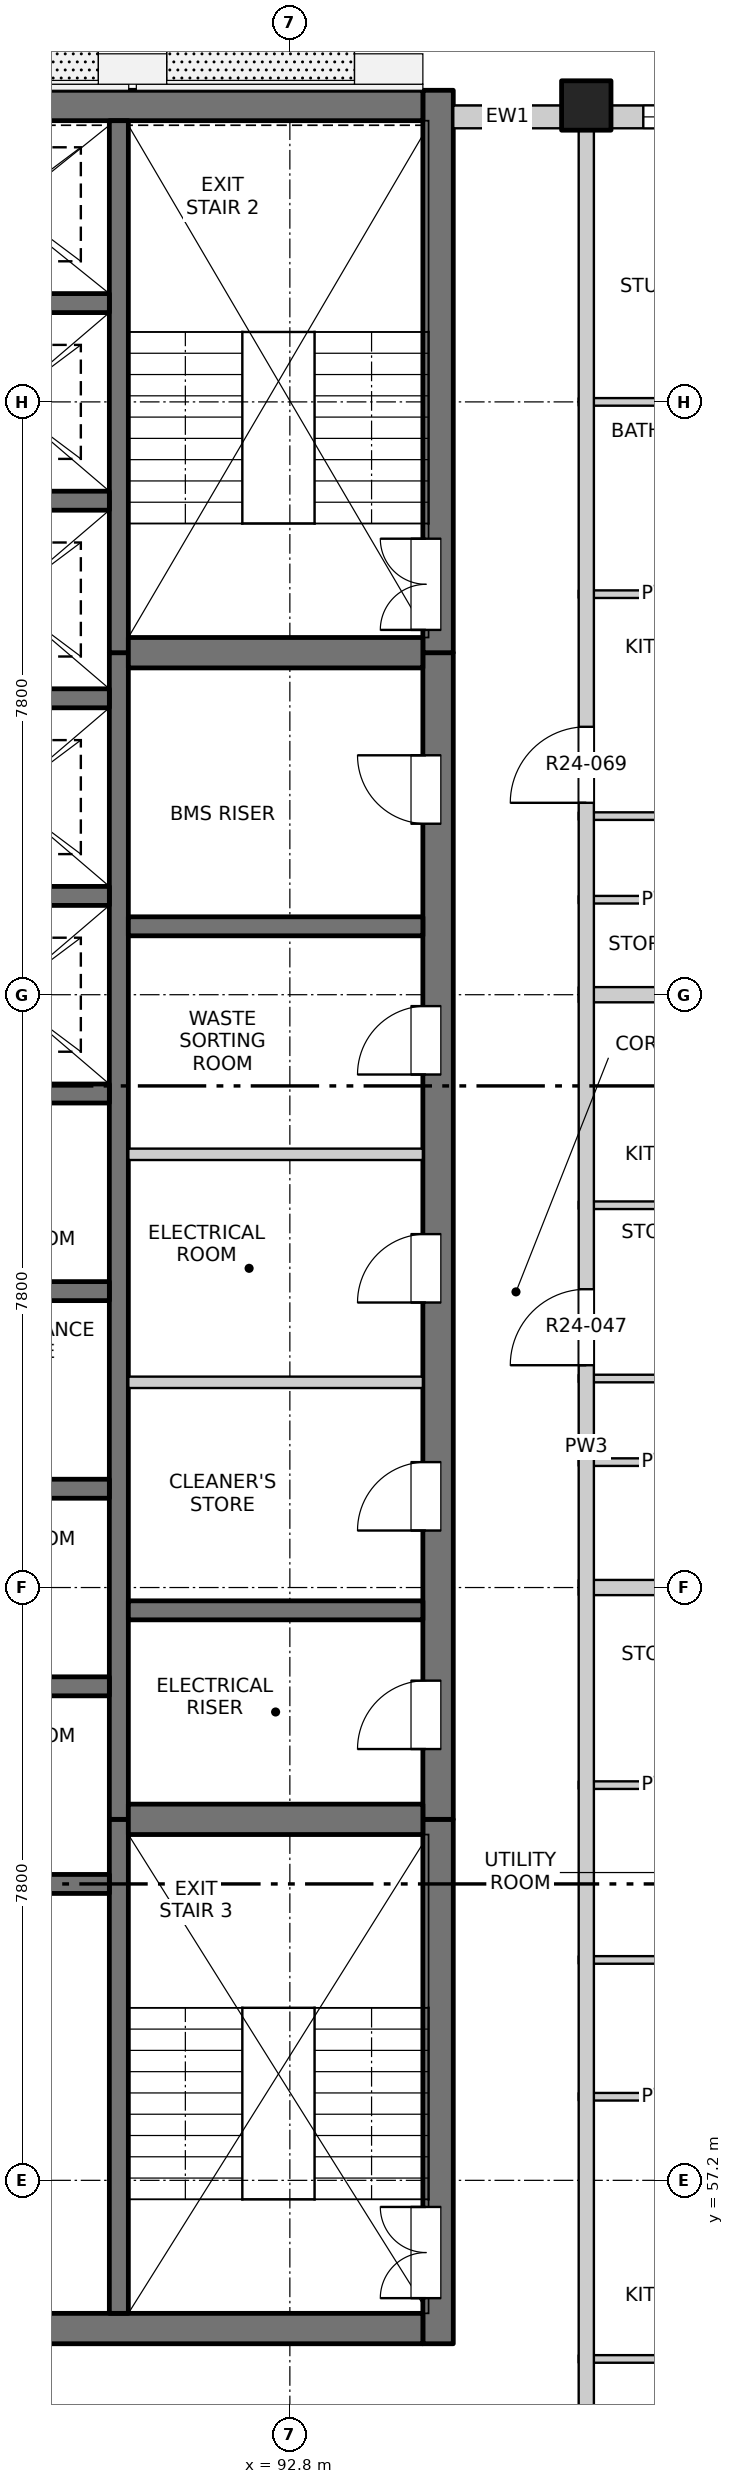
"""IFC4 building model, lengths in metres.
Left out: names, types, materials, properties, quantities, classifications, styles, units other than length and angle.
Written with IfcOpenShell. Run it as: python <this file> out.ifc"""

import sys

from ifc_helpers import new_model, si_unit, direction, frame, frame_2d, origin, origin_2d, place, context, subcontext, project, spatial, rectangle, extrude, element, fill, save


model = new_model("IFC4")
c1 = context("Model", 3, precision=1e-05, world=origin(), true_north=direction((0.0, 1.0)))
c2 = subcontext(c1, "Body", "Model", "MODEL_VIEW")
j1 = project(units=[si_unit("LENGTHUNIT", "METRE"), si_unit("PLANEANGLEUNIT", "RADIAN")], contexts=[c1])
p1 = place(None, origin())
s1 = spatial("IfcSite", under=j1, at=p1, CompositionType="ELEMENT")
p2 = place(p1, origin())
s2 = spatial("IfcBuilding", under=s1, at=p2, CompositionType="ELEMENT")
p3 = place(p2, frame((0.0, 0.0, 249.4)))
s3 = spatial("IfcBuildingStorey", under=s2, at=p3, CompositionType="ELEMENT", Elevation=249.4)
p4 = place(p3, frame((96.7, 84.5, -0.25), z_axis=(0.0, 0.0, 1.0), x_axis=(1.0, 0.0, 0.0)))
e1 = element("IfcColumn", 1, at=p4, inside=s3, PredefinedType="COLUMN", context=c2, shape_type="SweptSolid", body=[
    extrude(rectangle(XDim=0.65, YDim=0.65, at=origin_2d()), origin(), (0.0, 0.0, 1.0), 3.4),
])
p5 = place(p3, frame((94.75, 55.05, -0.25), z_axis=(0.0, 0.0, 1.0), x_axis=(0.0, 1.0, 0.0)))
e2 = element("IfcWall", 2, at=p5, inside=s3, PredefinedType="SOLIDWALL", context=c2, shape_type="SweptSolid", body=[
    extrude(rectangle(XDim=6.9, YDim=0.4, at=frame_2d((3.45, 0.0))), origin(), (0.0, 0.0, 1.0), 3.4),
])
p6 = place(p5, frame((0.6, 0.0, 0.25)))
e3 = element("IfcOpeningElement", 3, at=p6, cuts=e2, PredefinedType="OPENING", context=c2, shape_type="SweptSolid", body=[
    extrude(rectangle(XDim=1.2, YDim=2.1, at=frame_2d((0.6, 1.05))), frame((0.0, 0.21, 0.0), z_axis=(0.0, -1.0, 0.0), x_axis=(1.0, 0.0, 0.0)), (0.0, 0.0, 1.0), 0.42),
])
p7 = place(p3, frame((94.75, 61.95, -0.25), z_axis=(0.0, 0.0, 1.0), x_axis=(0.0, 1.0, 0.0)))
e4 = element("IfcWall", 4, at=p7, inside=s3, PredefinedType="SOLIDWALL", context=c2, shape_type="SweptSolid", body=[
    extrude(rectangle(XDim=15.35, YDim=0.4, at=frame_2d((7.675, 0.0))), origin(), (0.0, 0.0, 1.0), 3.4),
])
p8 = place(p7, frame((0.925, 0.0, 0.25)))
e5 = element("IfcOpeningElement", 5, at=p8, cuts=e4, PredefinedType="OPENING", context=c2, shape_type="SweptSolid", body=[
    extrude(rectangle(XDim=0.9, YDim=2.1, at=frame_2d((0.45, 1.05))), frame((0.0, 0.21, 0.0), z_axis=(0.0, -1.0, 0.0), x_axis=(1.0, 0.0, 0.0)), (0.0, 0.0, 1.0), 0.42),
])
p9 = place(p7, frame((3.8, 0.0, 0.25)))
e6 = element("IfcOpeningElement", 6, at=p9, cuts=e4, PredefinedType="OPENING", context=c2, shape_type="SweptSolid", body=[
    extrude(rectangle(XDim=0.9, YDim=2.1, at=frame_2d((0.45, 1.05))), frame((0.0, 0.21, 0.0), z_axis=(0.0, -1.0, 0.0), x_axis=(1.0, 0.0, 0.0)), (0.0, 0.0, 1.0), 0.42),
])
p10 = place(p7, frame((6.8, 0.0, 0.25)))
e7 = element("IfcOpeningElement", 7, at=p10, cuts=e4, PredefinedType="OPENING", context=c2, shape_type="SweptSolid", body=[
    extrude(rectangle(XDim=0.9, YDim=2.1, at=frame_2d((0.45, 1.05))), frame((0.0, 0.21, 0.0), z_axis=(0.0, -1.0, 0.0), x_axis=(1.0, 0.0, 0.0)), (0.0, 0.0, 1.0), 0.42),
])
p11 = place(p7, frame((9.8, 0.0, 0.25)))
e8 = element("IfcOpeningElement", 8, at=p11, cuts=e4, PredefinedType="OPENING", context=c2, shape_type="SweptSolid", body=[
    extrude(rectangle(XDim=0.9, YDim=2.1, at=frame_2d((0.45, 1.05))), frame((0.0, 0.21, 0.0), z_axis=(0.0, -1.0, 0.0), x_axis=(1.0, 0.0, 0.0)), (0.0, 0.0, 1.0), 0.42),
])
p12 = place(p7, frame((13.1, 0.0, 0.25)))
e9 = element("IfcOpeningElement", 9, at=p12, cuts=e4, PredefinedType="OPENING", context=c2, shape_type="SweptSolid", body=[
    extrude(rectangle(XDim=0.9, YDim=2.1, at=frame_2d((0.45, 1.05))), frame((0.0, 0.21, 0.0), z_axis=(0.0, -1.0, 0.0), x_axis=(1.0, 0.0, 0.0)), (0.0, 0.0, 1.0), 0.42),
])
p13 = place(p3, frame((94.75, 77.3, -0.25), z_axis=(0.0, 0.0, 1.0), x_axis=(0.0, 1.0, 0.0)))
e10 = element("IfcWall", 10, at=p13, inside=s3, PredefinedType="SOLIDWALL", context=c2, shape_type="SweptSolid", body=[
    extrude(rectangle(XDim=7.4, YDim=0.4, at=frame_2d((3.7, 0.0))), origin(), (0.0, 0.0, 1.0), 3.4),
])
p14 = place(p13, frame((0.3, 0.0, 0.25)))
e11 = element("IfcOpeningElement", 11, at=p14, cuts=e10, PredefinedType="OPENING", context=c2, shape_type="SweptSolid", body=[
    extrude(rectangle(XDim=1.2, YDim=2.1, at=frame_2d((0.6, 1.05))), frame((0.0, 0.21, 0.0), z_axis=(0.0, -1.0, 0.0), x_axis=(1.0, 0.0, 0.0)), (0.0, 0.0, 1.0), 0.42),
])
p15 = place(p3, frame((75.45, 55.25, -0.25), z_axis=(0.0, 0.0, 1.0), x_axis=(1.0, 0.0, 0.0)))
e12 = element("IfcWall", 12, at=p15, inside=s3, PredefinedType="SOLIDWALL", context=c2, shape_type="SweptSolid", body=[
    extrude(rectangle(XDim=19.1, YDim=0.4, at=frame_2d((9.55, 0.0))), origin(), (0.0, 0.0, 1.0), 3.4),
])
p16 = place(p15, frame((8.8, 0.0, 0.25)))
e13 = element("IfcOpeningElement", 13, at=p16, cuts=e12, PredefinedType="OPENING", context=c2, shape_type="SweptSolid", body=[
    extrude(rectangle(XDim=1.5, YDim=2.1, at=frame_2d((0.75, 1.05))), frame((0.0, 0.21, 0.0), z_axis=(0.0, -1.0, 0.0), x_axis=(1.0, 0.0, 0.0)), (0.0, 0.0, 1.0), 0.42),
])
p17 = place(p3, frame((75.45, 84.5, -0.25), z_axis=(0.0, 0.0, 1.0), x_axis=(1.0, 0.0, 0.0)))
e14 = element("IfcWall", 14, at=p17, inside=s3, PredefinedType="SOLIDWALL", context=c2, shape_type="SweptSolid", body=[
    extrude(rectangle(XDim=19.1, YDim=0.4, at=frame_2d((9.55, 0.0))), origin(), (0.0, 0.0, 1.0), 3.4),
])
p18 = place(p3, frame((90.55, 55.45, -0.25), z_axis=(0.0, 0.0, 1.0), x_axis=(0.0, 1.0, 0.0)))
e15 = element("IfcWall", 15, at=p18, inside=s3, PredefinedType="SOLIDWALL", context=c2, shape_type="SweptSolid", body=[
    extrude(rectangle(XDim=6.5, YDim=0.25, at=frame_2d((3.25, 0.0))), origin(), (0.0, 0.0, 1.0), 3.4),
])
p19 = place(p3, frame((90.55, 61.95, -0.25), z_axis=(0.0, 0.0, 1.0), x_axis=(0.0, 1.0, 0.0)))
e16 = element("IfcWall", 16, at=p19, inside=s3, PredefinedType="SOLIDWALL", context=c2, shape_type="SweptSolid", body=[
    extrude(rectangle(XDim=15.35, YDim=0.25, at=frame_2d((7.675, 0.0))), origin(), (0.0, 0.0, 1.0), 3.4),
])
p20 = place(p3, frame((90.55, 77.3, -0.25), z_axis=(0.0, 0.0, 1.0), x_axis=(0.0, 1.0, 0.0)))
e17 = element("IfcWall", 17, at=p20, inside=s3, PredefinedType="SOLIDWALL", context=c2, shape_type="SweptSolid", body=[
    extrude(rectangle(XDim=7.0, YDim=0.25, at=frame_2d((3.5, 0.0))), origin(), (0.0, 0.0, 1.0), 3.4),
])
for number, where, z_axis, x_axis in (
    (18, (87.425, 61.1, -0.25), (0.0, 0.0, 1.0), (1.0, 0.0, 0.0)),
    (19, (87.425, 63.7, -0.25), (0.0, 0.0, 1.0), (1.0, 0.0, 0.0)),
    (20, (87.425, 66.3, -0.25), (0.0, 0.0, 1.0), (1.0, 0.0, 0.0)),
    (21, (87.425, 68.9, -0.25), (0.0, 0.0, 1.0), (1.0, 0.0, 0.0)),
    (22, (87.425, 71.5, -0.25), (0.0, 0.0, 1.0), (1.0, 0.0, 0.0)),
    (23, (87.425, 74.1, -0.25), (0.0, 0.0, 1.0), (1.0, 0.0, 0.0)),
    (24, (87.425, 76.7, -0.25), (0.0, 0.0, 1.0), (1.0, 0.0, 0.0)),
    (25, (87.425, 79.3, -0.25), (0.0, 0.0, 1.0), (1.0, 0.0, 0.0)),
    (26, (87.425, 81.9, -0.25), (0.0, 0.0, 1.0), (1.0, 0.0, 0.0)),
):
    element("IfcWall", number, at=place(p3, frame(where, z_axis=z_axis, x_axis=x_axis)), inside=s3, PredefinedType="SOLIDWALL", context=c2, shape_type="SweptSolid", body=[
        extrude(rectangle(XDim=3.0, YDim=0.25, at=frame_2d((1.5, 0.0))), origin(), (0.0, 0.0, 1.0), 3.4),
    ])
p21 = place(p3, frame((90.675, 61.95, -0.25), z_axis=(0.0, 0.0, 1.0), x_axis=(1.0, 0.0, 0.0)))
e27 = element("IfcWall", 27, at=p21, inside=s3, PredefinedType="SOLIDWALL", context=c2, shape_type="SweptSolid", body=[
    extrude(rectangle(XDim=3.875, YDim=0.4, at=frame_2d((1.938, 0.0))), origin(), (0.0, 0.0, 1.0), 3.4),
])
for number, where, z_axis, x_axis in (
    (28, (90.675, 64.7, -0.25), (0.0, 0.0, 1.0), (1.0, 0.0, 0.0)),
    (29, (90.675, 73.7, -0.25), (0.0, 0.0, 1.0), (1.0, 0.0, 0.0)),
):
    element("IfcWall", number, at=place(p3, frame(where, z_axis=z_axis, x_axis=x_axis)), inside=s3, PredefinedType="SOLIDWALL", context=c2, shape_type="SweptSolid", body=[
        extrude(rectangle(XDim=3.875, YDim=0.25, at=frame_2d((1.938, 0.0))), origin(), (0.0, 0.0, 1.0), 3.4),
    ])
p22 = place(p3, frame((90.675, 77.3, -0.25), z_axis=(0.0, 0.0, 1.0), x_axis=(1.0, 0.0, 0.0)))
e30 = element("IfcWall", 30, at=p22, inside=s3, PredefinedType="SOLIDWALL", context=c2, shape_type="SweptSolid", body=[
    extrude(rectangle(XDim=3.875, YDim=0.4, at=frame_2d((1.938, 0.0))), origin(), (0.0, 0.0, 1.0), 3.4),
])
p23 = place(p3, frame((94.95, 84.35, 0.0), z_axis=(0.0, 0.0, 1.0), x_axis=(1.0, 0.0, 0.0)))
e31 = element("IfcWall", 31, at=p23, inside=s3, PredefinedType="SOLIDWALL", context=c2, shape_type="SweptSolid", body=[
    extrude(rectangle(XDim=1.425, YDim=0.3, at=frame_2d((0.712, 0.0))), origin(), (0.0, 0.0, 1.0), 2.7),
])
p24 = place(p3, frame((97.025, 84.35, 0.0), z_axis=(0.0, 0.0, 1.0), x_axis=(1.0, 0.0, 0.0)))
e32 = element("IfcWall", 32, at=p24, inside=s3, PredefinedType="SOLIDWALL", context=c2, shape_type="SweptSolid", body=[
    extrude(rectangle(XDim=3.575, YDim=0.3, at=frame_2d((1.788, 0.0))), origin(), (0.0, 0.0, 1.0), 2.7),
])
p25 = place(p24, frame((0.425, 0.0, 0.9)))
e33 = element("IfcOpeningElement", 33, at=p25, cuts=e32, PredefinedType="OPENING", context=c2, shape_type="SweptSolid", body=[
    extrude(rectangle(XDim=2.4, YDim=1.8, at=frame_2d((1.2, 0.9))), frame((0.0, 0.16, 0.0), z_axis=(0.0, -1.0, 0.0), x_axis=(1.0, 0.0, 0.0)), (0.0, 0.0, 1.0), 0.32),
])
for number, where, z_axis, x_axis in (
    (34, (96.6, 54.85, 0.0), (0.0, 0.0, 1.0), (1.0, 0.0, 0.0)),
    (35, (96.6, 58.3, 0.0), (0.0, 0.0, 1.0), (1.0, 0.0, 0.0)),
    (36, (96.6, 60.1, 0.0), (0.0, 0.0, 1.0), (1.0, 0.0, 0.0)),
    (37, (96.6, 62.4, 0.0), (0.0, 0.0, 1.0), (1.0, 0.0, 0.0)),
):
    element("IfcWall", number, at=place(p3, frame(where, z_axis=z_axis, x_axis=x_axis)), inside=s3, PredefinedType="PARTITIONING", context=c2, shape_type="SweptSolid", body=[
        extrude(rectangle(XDim=2.22, YDim=0.1, at=frame_2d((1.11, 0.0))), origin(), (0.0, 0.0, 1.0), 3.15),
    ])
p26 = place(p3, frame((96.6, 65.0, 0.0), z_axis=(0.0, 0.0, 1.0), x_axis=(1.0, 0.0, 0.0)))
e38 = element("IfcWall", 38, at=p26, inside=s3, PredefinedType="PARTITIONING", context=c2, shape_type="SweptSolid", body=[
    extrude(rectangle(XDim=7.6, YDim=0.2, at=frame_2d((3.8, 0.0))), origin(), (0.0, 0.0, 1.0), 3.15),
])
p27 = place(p3, frame((96.6, 66.65, 0.0), z_axis=(0.0, 0.0, 1.0), x_axis=(1.0, 0.0, 0.0)))
e39 = element("IfcWall", 39, at=p27, inside=s3, PredefinedType="PARTITIONING", context=c2, shape_type="SweptSolid", body=[
    extrude(rectangle(XDim=2.22, YDim=0.1, at=frame_2d((1.11, 0.0))), origin(), (0.0, 0.0, 1.0), 3.15),
])
p28 = place(p3, frame((90.675, 67.7, 0.0), z_axis=(0.0, 0.0, 1.0), x_axis=(1.0, 0.0, 0.0)))
e40 = element("IfcWall", 40, at=p28, inside=s3, PredefinedType="PARTITIONING", context=c2, shape_type="SweptSolid", body=[
    extrude(rectangle(XDim=3.875, YDim=0.15, at=frame_2d((1.938, 0.0))), origin(), (0.0, 0.0, 1.0), 3.15),
])
for number, where, z_axis, x_axis in (
    (41, (96.6, 67.75, 0.0), (0.0, 0.0, 1.0), (1.0, 0.0, 0.0)),
    (42, (96.6, 70.03, 0.0), (0.0, 0.0, 1.0), (1.0, 0.0, 0.0)),
):
    element("IfcWall", number, at=place(p3, frame(where, z_axis=z_axis, x_axis=x_axis)), inside=s3, PredefinedType="PARTITIONING", context=c2, shape_type="SweptSolid", body=[
        extrude(rectangle(XDim=2.22, YDim=0.1, at=frame_2d((1.11, 0.0))), origin(), (0.0, 0.0, 1.0), 3.15),
    ])
p29 = place(p3, frame((90.675, 70.7, 0.0), z_axis=(0.0, 0.0, 1.0), x_axis=(1.0, 0.0, 0.0)))
e43 = element("IfcWall", 43, at=p29, inside=s3, PredefinedType="PARTITIONING", context=c2, shape_type="SweptSolid", body=[
    extrude(rectangle(XDim=3.875, YDim=0.15, at=frame_2d((1.938, 0.0))), origin(), (0.0, 0.0, 1.0), 3.15),
])
p30 = place(p3, frame((96.6, 72.8, 0.0), z_axis=(0.0, 0.0, 1.0), x_axis=(1.0, 0.0, 0.0)))
e44 = element("IfcWall", 44, at=p30, inside=s3, PredefinedType="PARTITIONING", context=c2, shape_type="SweptSolid", body=[
    extrude(rectangle(XDim=7.6, YDim=0.2, at=frame_2d((3.8, 0.0))), origin(), (0.0, 0.0, 1.0), 3.15),
])
for number, where, z_axis, x_axis in (
    (45, (96.6, 74.05, 0.0), (0.0, 0.0, 1.0), (1.0, 0.0, 0.0)),
    (46, (96.6, 75.15, 0.0), (0.0, 0.0, 1.0), (1.0, 0.0, 0.0)),
    (47, (96.6, 78.07, 0.0), (0.0, 0.0, 1.0), (1.0, 0.0, 0.0)),
):
    element("IfcWall", number, at=place(p3, frame(where, z_axis=z_axis, x_axis=x_axis)), inside=s3, PredefinedType="PARTITIONING", context=c2, shape_type="SweptSolid", body=[
        extrude(rectangle(XDim=2.22, YDim=0.1, at=frame_2d((1.11, 0.0))), origin(), (0.0, 0.0, 1.0), 3.15),
    ])
p31 = place(p3, frame((96.6, 80.6, 0.0), z_axis=(0.0, 0.0, 1.0), x_axis=(1.0, 0.0, 0.0)))
e48 = element("IfcWall", 48, at=p31, inside=s3, PredefinedType="PARTITIONING", context=c2, shape_type="SweptSolid", body=[
    extrude(rectangle(XDim=7.6, YDim=0.1, at=frame_2d((3.8, 0.0))), origin(), (0.0, 0.0, 1.0), 3.15),
])
p32 = place(p31, frame((2.61, 0.0, 0.0)))
e49 = element("IfcOpeningElement", 49, at=p32, cuts=e48, PredefinedType="OPENING", context=c2, shape_type="SweptSolid", body=[
    extrude(rectangle(XDim=0.9, YDim=2.1, at=frame_2d((0.45, 1.05))), frame((0.0, 0.06, 0.0), z_axis=(0.0, -1.0, 0.0), x_axis=(1.0, 0.0, 0.0)), (0.0, 0.0, 1.0), 0.12),
])
p33 = place(p3, frame((96.7, 49.5, 0.0), z_axis=(0.0, 0.0, 1.0), x_axis=(0.0, 1.0, 0.0)))
e50 = element("IfcWall", 50, at=p33, inside=s3, PredefinedType="PARTITIONING", context=c2, shape_type="SweptSolid", body=[
    extrude(rectangle(XDim=34.7, YDim=0.2, at=frame_2d((17.35, 0.0))), origin(), (0.0, 0.0, 1.0), 3.15),
])
p34 = place(p33, frame((3.075, 0.0, 0.0)))
e51 = element("IfcOpeningElement", 51, at=p34, cuts=e50, PredefinedType="OPENING", context=c2, shape_type="SweptSolid", body=[
    extrude(rectangle(XDim=1.0, YDim=2.1, at=frame_2d((0.5, 1.05))), frame((0.0, 0.11, 0.0), z_axis=(0.0, -1.0, 0.0), x_axis=(1.0, 0.0, 0.0)), (0.0, 0.0, 1.0), 0.22),
])
p35 = place(p33, frame((18.425, 0.0, 0.0)))
e52 = element("IfcOpeningElement", 52, at=p35, cuts=e50, PredefinedType="OPENING", context=c2, shape_type="SweptSolid", body=[
    extrude(rectangle(XDim=1.0, YDim=2.1, at=frame_2d((0.5, 1.05))), frame((0.0, 0.11, 0.0), z_axis=(0.0, -1.0, 0.0), x_axis=(1.0, 0.0, 0.0)), (0.0, 0.0, 1.0), 0.22),
])
p36 = place(p33, frame((25.825, 0.0, 0.0)))
e53 = element("IfcOpeningElement", 53, at=p36, cuts=e50, PredefinedType="OPENING", context=c2, shape_type="SweptSolid", body=[
    extrude(rectangle(XDim=1.0, YDim=2.1, at=frame_2d((0.5, 1.05))), frame((0.0, 0.11, 0.0), z_axis=(0.0, -1.0, 0.0), x_axis=(1.0, 0.0, 0.0)), (0.0, 0.0, 1.0), 0.22),
])
p37 = place(p25, origin())
e54 = element("IfcWindow", 54, at=p37, inside=s3, PartitioningType="DOUBLE_PANEL_VERTICAL", PredefinedType="WINDOW", context=c2, shape_type="SweptSolid", body=[
    extrude(rectangle(XDim=2.4, YDim=1.8, at=frame_2d((1.2, 0.9))), frame((0.0, 0.03, 0.0), z_axis=(0.0, -1.0, 0.0), x_axis=(1.0, 0.0, 0.0)), (0.0, 0.0, 1.0), 0.06),
])
fill(e33, e54)
p38 = place(p6, origin())
e55 = element("IfcDoor", 55, at=p38, inside=s3, OperationType="DOUBLE_DOOR_SINGLE_SWING", PredefinedType="DOOR", context=c2, shape_type="SweptSolid", body=[
    extrude(rectangle(XDim=1.2, YDim=2.1, at=frame_2d((0.6, 1.05))), frame((0.0, 0.185, 0.0), z_axis=(0.0, -1.0, 0.0), x_axis=(1.0, 0.0, 0.0)), (0.0, 0.0, 1.0), 0.05),
])
fill(e3, e55)
p39 = place(p8, origin())
e56 = element("IfcDoor", 56, at=p39, inside=s3, OperationType="SINGLE_SWING_LEFT", PredefinedType="DOOR", context=c2, shape_type="SweptSolid", body=[
    extrude(rectangle(XDim=0.9, YDim=2.1, at=frame_2d((0.45, 1.05))), frame((0.0, 0.185, 0.0), z_axis=(0.0, -1.0, 0.0), x_axis=(1.0, 0.0, 0.0)), (0.0, 0.0, 1.0), 0.05),
])
fill(e5, e56)
p40 = place(p9, origin())
e57 = element("IfcDoor", 57, at=p40, inside=s3, OperationType="SINGLE_SWING_LEFT", PredefinedType="DOOR", context=c2, shape_type="SweptSolid", body=[
    extrude(rectangle(XDim=0.9, YDim=2.1, at=frame_2d((0.45, 1.05))), frame((0.0, 0.185, 0.0), z_axis=(0.0, -1.0, 0.0), x_axis=(1.0, 0.0, 0.0)), (0.0, 0.0, 1.0), 0.05),
])
fill(e6, e57)
p41 = place(p35, origin())
e58 = element("IfcDoor", 58, at=p41, inside=s3, OperationType="SINGLE_SWING_LEFT", PredefinedType="DOOR", context=c2, shape_type="SweptSolid", body=[
    extrude(rectangle(XDim=1.0, YDim=2.1, at=frame_2d((0.5, 1.05))), frame((0.0, 0.025, 0.0), z_axis=(0.0, -1.0, 0.0), x_axis=(1.0, 0.0, 0.0)), (0.0, 0.0, 1.0), 0.05),
])
fill(e52, e58)
p42 = place(p10, origin())
e59 = element("IfcDoor", 59, at=p42, inside=s3, OperationType="SINGLE_SWING_LEFT", PredefinedType="DOOR", context=c2, shape_type="SweptSolid", body=[
    extrude(rectangle(XDim=0.9, YDim=2.1, at=frame_2d((0.45, 1.05))), frame((0.0, 0.185, 0.0), z_axis=(0.0, -1.0, 0.0), x_axis=(1.0, 0.0, 0.0)), (0.0, 0.0, 1.0), 0.05),
])
fill(e7, e59)
p43 = place(p11, origin())
e60 = element("IfcDoor", 60, at=p43, inside=s3, OperationType="SINGLE_SWING_LEFT", PredefinedType="DOOR", context=c2, shape_type="SweptSolid", body=[
    extrude(rectangle(XDim=0.9, YDim=2.1, at=frame_2d((0.45, 1.05))), frame((0.0, 0.185, 0.0), z_axis=(0.0, -1.0, 0.0), x_axis=(1.0, 0.0, 0.0)), (0.0, 0.0, 1.0), 0.05),
])
fill(e8, e60)
p44 = place(p12, origin())
e61 = element("IfcDoor", 61, at=p44, inside=s3, OperationType="SINGLE_SWING_RIGHT", PredefinedType="DOOR", context=c2, shape_type="SweptSolid", body=[
    extrude(rectangle(XDim=0.9, YDim=2.1, at=frame_2d((0.45, 1.05))), frame((0.0, 0.185, 0.0), z_axis=(0.0, -1.0, 0.0), x_axis=(1.0, 0.0, 0.0)), (0.0, 0.0, 1.0), 0.05),
])
fill(e9, e61)
p45 = place(p36, origin())
e62 = element("IfcDoor", 62, at=p45, inside=s3, OperationType="SINGLE_SWING_LEFT", PredefinedType="DOOR", context=c2, shape_type="SweptSolid", body=[
    extrude(rectangle(XDim=1.0, YDim=2.1, at=frame_2d((0.5, 1.05))), frame((0.0, 0.025, 0.0), z_axis=(0.0, -1.0, 0.0), x_axis=(1.0, 0.0, 0.0)), (0.0, 0.0, 1.0), 0.05),
])
fill(e53, e62)
p46 = place(p14, origin())
e63 = element("IfcDoor", 63, at=p46, inside=s3, OperationType="DOUBLE_DOOR_SINGLE_SWING", PredefinedType="DOOR", context=c2, shape_type="SweptSolid", body=[
    extrude(rectangle(XDim=1.2, YDim=2.1, at=frame_2d((0.6, 1.05))), frame((0.0, 0.185, 0.0), z_axis=(0.0, -1.0, 0.0), x_axis=(1.0, 0.0, 0.0)), (0.0, 0.0, 1.0), 0.05),
])
fill(e11, e63)
save(model, sys.argv[1])
